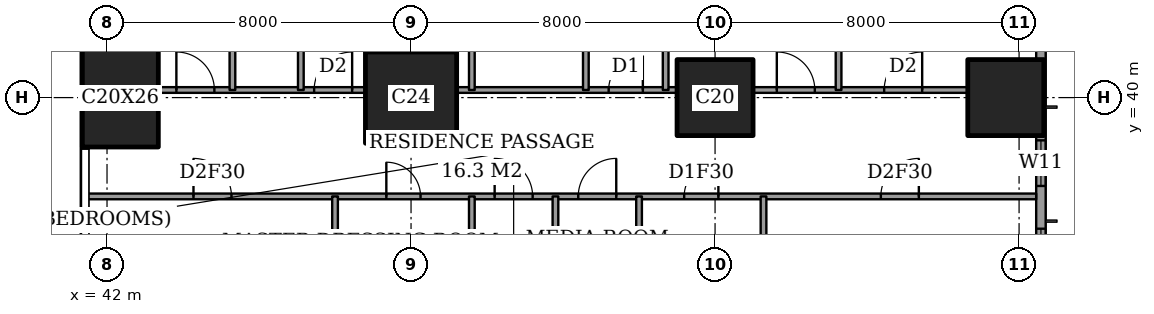
"""IFC4 building model, lengths in metres.
Left out: names, types, materials, properties, quantities, classifications, styles, units other than length and angle.
Written with IfcOpenShell. Run it as: python <this file> out.ifc"""

import sys

from ifc_helpers import new_model, si_unit, direction, frame, frame_2d, origin, origin_2d, place, context, subcontext, project, spatial, rectangle, extrude, element, fill, save


model = new_model("IFC4")
c1 = context("Model", 3, precision=1e-05, world=origin(), true_north=direction((0.0, 1.0)))
c2 = subcontext(c1, "Body", "Model", "MODEL_VIEW")
j1 = project(units=[si_unit("LENGTHUNIT", "METRE"), si_unit("PLANEANGLEUNIT", "RADIAN")], contexts=[c1])
p1 = place(None, origin())
s1 = spatial("IfcSite", under=j1, at=p1, CompositionType="ELEMENT")
p2 = place(p1, origin())
s2 = spatial("IfcBuilding", under=s1, at=p2, CompositionType="ELEMENT")
p3 = place(p2, frame((0.0, 0.0, 153.8)))
s3 = spatial("IfcBuildingStorey", under=s2, at=p3, CompositionType="ELEMENT", Elevation=153.8)
p4 = place(p3, frame((42.35, 40.0, 0.0), z_axis=(0.0, 0.0, 1.0), x_axis=(1.0, 0.0, 0.0)))
e1 = element("IfcColumn", 1, at=p4, inside=s3, PredefinedType="COLUMN", context=c2, shape_type="SweptSolid", body=[
    extrude(rectangle(XDim=2.0, YDim=2.6, at=origin_2d()), origin(), (0.0, 0.0, 1.0), 3.6),
])
p5 = place(p3, frame((50.0, 40.0, 0.0), z_axis=(0.0, 0.0, 1.0), x_axis=(1.0, 0.0, 0.0)))
e2 = element("IfcColumn", 2, at=p5, inside=s3, PredefinedType="COLUMN", context=c2, shape_type="SweptSolid", body=[
    extrude(rectangle(XDim=2.4, YDim=2.4, at=origin_2d()), origin(), (0.0, 0.0, 1.0), 3.6),
])
for number, where, z_axis, x_axis in (
    (3, (58.0, 40.0, 0.0), (0.0, 0.0, 1.0), (1.0, 0.0, 0.0)),
    (4, (65.65, 40.0, 0.0), (0.0, 0.0, 1.0), (1.0, 0.0, 0.0)),
):
    element("IfcColumn", number, at=place(p3, frame(where, z_axis=z_axis, x_axis=x_axis)), inside=s3, PredefinedType="COLUMN", context=c2, shape_type="SweptSolid", body=[
        extrude(rectangle(XDim=2.0, YDim=2.0, at=origin_2d()), origin(), (0.0, 0.0, 1.0), 3.6),
    ])
p6 = place(p3, frame((66.575, 3.175, 0.0), z_axis=(0.0, 0.0, 1.0), x_axis=(0.0, 1.0, 0.0)))
e5 = element("IfcWall", 5, at=p6, inside=s3, PredefinedType="SOLIDWALL", context=c2, shape_type="SweptSolid", body=[
    extrude(rectangle(XDim=41.65, YDim=0.25, at=frame_2d((20.825, 0.0))), origin(), (0.0, 0.0, 1.0), 3.6),
])
p7 = place(p6, frame((0.775, 0.0, 0.4)))
e6 = element("IfcOpeningElement", 6, at=p7, cuts=e5, PredefinedType="OPENING", context=c2, shape_type="SweptSolid", body=[
    extrude(rectangle(XDim=2.4, YDim=2.2, at=frame_2d((1.2, 1.1))), frame((0.0, 0.135, 0.0), z_axis=(0.0, -1.0, 0.0), x_axis=(1.0, 0.0, 0.0)), (0.0, 0.0, 1.0), 0.27),
])
p8 = place(p6, frame((6.225, 0.0, 0.4)))
e7 = element("IfcOpeningElement", 7, at=p8, cuts=e5, PredefinedType="OPENING", context=c2, shape_type="SweptSolid", body=[
    extrude(rectangle(XDim=1.2, YDim=2.2, at=frame_2d((0.6, 1.1))), frame((0.0, 0.135, 0.0), z_axis=(0.0, -1.0, 0.0), x_axis=(1.0, 0.0, 0.0)), (0.0, 0.0, 1.0), 0.27),
])
p9 = place(p6, frame((8.475, 0.0, 0.4)))
e8 = element("IfcOpeningElement", 8, at=p9, cuts=e5, PredefinedType="OPENING", context=c2, shape_type="SweptSolid", body=[
    extrude(rectangle(XDim=2.4, YDim=2.2, at=frame_2d((1.2, 1.1))), frame((0.0, 0.135, 0.0), z_axis=(0.0, -1.0, 0.0), x_axis=(1.0, 0.0, 0.0)), (0.0, 0.0, 1.0), 0.27),
])
p10 = place(p6, frame((15.775, 0.0, 0.4)))
e9 = element("IfcOpeningElement", 9, at=p10, cuts=e5, PredefinedType="OPENING", context=c2, shape_type="SweptSolid", body=[
    extrude(rectangle(XDim=2.4, YDim=2.2, at=frame_2d((1.2, 1.1))), frame((0.0, 0.135, 0.0), z_axis=(0.0, -1.0, 0.0), x_axis=(1.0, 0.0, 0.0)), (0.0, 0.0, 1.0), 0.27),
])
p11 = place(p6, frame((23.475, 0.0, 0.4)))
e10 = element("IfcOpeningElement", 10, at=p11, cuts=e5, PredefinedType="OPENING", context=c2, shape_type="SweptSolid", body=[
    extrude(rectangle(XDim=2.4, YDim=2.2, at=frame_2d((1.2, 1.1))), frame((0.0, 0.135, 0.0), z_axis=(0.0, -1.0, 0.0), x_axis=(1.0, 0.0, 0.0)), (0.0, 0.0, 1.0), 0.27),
])
p12 = place(p6, frame((30.975, 0.0, 0.4)))
e11 = element("IfcOpeningElement", 11, at=p12, cuts=e5, PredefinedType="OPENING", context=c2, shape_type="SweptSolid", body=[
    extrude(rectangle(XDim=2.4, YDim=2.2, at=frame_2d((1.2, 1.1))), frame((0.0, 0.135, 0.0), z_axis=(0.0, -1.0, 0.0), x_axis=(1.0, 0.0, 0.0)), (0.0, 0.0, 1.0), 0.27),
])
p13 = place(p6, frame((34.5, 0.0, 0.4)))
e12 = element("IfcOpeningElement", 12, at=p13, cuts=e5, PredefinedType="OPENING", context=c2, shape_type="SweptSolid", body=[
    extrude(rectangle(XDim=1.2, YDim=2.2, at=frame_2d((0.6, 1.1))), frame((0.0, 0.135, 0.0), z_axis=(0.0, -1.0, 0.0), x_axis=(1.0, 0.0, 0.0)), (0.0, 0.0, 1.0), 0.27),
])
p14 = place(p6, frame((38.475, 0.0, 0.4)))
e13 = element("IfcOpeningElement", 13, at=p14, cuts=e5, PredefinedType="OPENING", context=c2, shape_type="SweptSolid", body=[
    extrude(rectangle(XDim=2.4, YDim=2.2, at=frame_2d((1.2, 1.1))), frame((0.0, 0.135, 0.0), z_axis=(0.0, -1.0, 0.0), x_axis=(1.0, 0.0, 0.0)), (0.0, 0.0, 1.0), 0.27),
])
p15 = place(p3, frame((41.439, 37.4, 0.0), z_axis=(0.0, 0.0, 1.0), x_axis=(1.0, 0.0, 0.0)))
e14 = element("IfcWall", 14, at=p15, inside=s3, PredefinedType="PARTITIONING", context=c2, shape_type="SweptSolid", body=[
    extrude(rectangle(XDim=25.011, YDim=0.15, at=frame_2d((12.505, 0.0))), origin(), (0.0, 0.0, 1.0), 3.35),
])
p16 = place(p15, frame((10.761, 0.0, 0.0)))
e15 = element("IfcOpeningElement", 15, at=p16, cuts=e14, PredefinedType="OPENING", context=c2, shape_type="SweptSolid", body=[
    extrude(rectangle(XDim=1.0, YDim=2.1, at=frame_2d((0.5, 1.05))), frame((0.0, 0.085, 0.0), z_axis=(0.0, -1.0, 0.0), x_axis=(1.0, 0.0, 0.0)), (0.0, 0.0, 1.0), 0.17),
])
p17 = place(p15, frame((20.924, 0.0, 0.0)))
e16 = element("IfcOpeningElement", 16, at=p17, cuts=e14, PredefinedType="OPENING", context=c2, shape_type="SweptSolid", body=[
    extrude(rectangle(XDim=1.0, YDim=2.1, at=frame_2d((0.5, 1.05))), frame((0.0, 0.085, 0.0), z_axis=(0.0, -1.0, 0.0), x_axis=(1.0, 0.0, 0.0)), (0.0, 0.0, 1.0), 0.17),
])
p18 = place(p15, frame((15.749, 0.0, 0.0)))
e17 = element("IfcOpeningElement", 17, at=p18, cuts=e14, PredefinedType="OPENING", context=c2, shape_type="SweptSolid", body=[
    extrude(rectangle(XDim=0.9, YDim=2.1, at=frame_2d((0.45, 1.05))), frame((0.0, 0.085, 0.0), z_axis=(0.0, -1.0, 0.0), x_axis=(1.0, 0.0, 0.0)), (0.0, 0.0, 1.0), 0.17),
])
p19 = place(p15, frame((12.961, 0.0, 0.0)))
e18 = element("IfcOpeningElement", 18, at=p19, cuts=e14, PredefinedType="OPENING", context=c2, shape_type="SweptSolid", body=[
    extrude(rectangle(XDim=1.0, YDim=2.1, at=frame_2d((0.5, 1.05))), frame((0.0, 0.085, 0.0), z_axis=(0.0, -1.0, 0.0), x_axis=(1.0, 0.0, 0.0)), (0.0, 0.0, 1.0), 0.17),
])
p20 = place(p15, frame((7.911, 0.0, 0.0)))
e19 = element("IfcOpeningElement", 19, at=p20, cuts=e14, PredefinedType="OPENING", context=c2, shape_type="SweptSolid", body=[
    extrude(rectangle(XDim=0.9, YDim=2.1, at=frame_2d((0.45, 1.05))), frame((0.0, 0.085, 0.0), z_axis=(0.0, -1.0, 0.0), x_axis=(1.0, 0.0, 0.0)), (0.0, 0.0, 1.0), 0.17),
])
p21 = place(p15, frame((2.836, 0.0, 0.0)))
e20 = element("IfcOpeningElement", 20, at=p21, cuts=e14, PredefinedType="OPENING", context=c2, shape_type="SweptSolid", body=[
    extrude(rectangle(XDim=1.0, YDim=2.1, at=frame_2d((0.5, 1.05))), frame((0.0, 0.085, 0.0), z_axis=(0.0, -1.0, 0.0), x_axis=(1.0, 0.0, 0.0)), (0.0, 0.0, 1.0), 0.17),
])
p22 = place(p3, frame((43.35, 40.2, 0.0), z_axis=(0.0, 0.0, 1.0), x_axis=(1.0, 0.0, 0.0)))
e21 = element("IfcWall", 21, at=p22, inside=s3, PredefinedType="PARTITIONING", context=c2, shape_type="SweptSolid", body=[
    extrude(rectangle(XDim=5.45, YDim=0.15, at=frame_2d((2.725, 0.0))), origin(), (0.0, 0.0, 1.0), 3.35),
])
p23 = place(p22, frame((4.1, 0.0, 0.0)))
e22 = element("IfcOpeningElement", 22, at=p23, cuts=e21, PredefinedType="OPENING", context=c2, shape_type="SweptSolid", body=[
    extrude(rectangle(XDim=1.0, YDim=2.1, at=frame_2d((0.5, 1.05))), frame((0.0, 0.085, 0.0), z_axis=(0.0, -1.0, 0.0), x_axis=(1.0, 0.0, 0.0)), (0.0, 0.0, 1.0), 0.17),
])
p24 = place(p22, frame((0.475, 0.0, 0.0)))
e23 = element("IfcOpeningElement", 23, at=p24, cuts=e21, PredefinedType="OPENING", context=c2, shape_type="SweptSolid", body=[
    extrude(rectangle(XDim=1.0, YDim=2.1, at=frame_2d((0.5, 1.05))), frame((0.0, 0.085, 0.0), z_axis=(0.0, -1.0, 0.0), x_axis=(1.0, 0.0, 0.0)), (0.0, 0.0, 1.0), 0.17),
])
p25 = place(p3, frame((51.2, 40.2, 0.0), z_axis=(0.0, 0.0, 1.0), x_axis=(1.0, 0.0, 0.0)))
e24 = element("IfcWall", 24, at=p25, inside=s3, PredefinedType="PARTITIONING", context=c2, shape_type="SweptSolid", body=[
    extrude(rectangle(XDim=5.8, YDim=0.15, at=frame_2d((2.9, 0.0))), origin(), (0.0, 0.0, 1.0), 3.35),
])
p26 = place(p25, frame((4.0, 0.0, 0.0)))
e25 = element("IfcOpeningElement", 25, at=p26, cuts=e24, PredefinedType="OPENING", context=c2, shape_type="SweptSolid", body=[
    extrude(rectangle(XDim=0.9, YDim=2.1, at=frame_2d((0.45, 1.05))), frame((0.0, 0.085, 0.0), z_axis=(0.0, -1.0, 0.0), x_axis=(1.0, 0.0, 0.0)), (0.0, 0.0, 1.0), 0.17),
])
p27 = place(p3, frame((59.0, 40.2, 0.0), z_axis=(0.0, 0.0, 1.0), x_axis=(1.0, 0.0, 0.0)))
e26 = element("IfcWall", 26, at=p27, inside=s3, PredefinedType="PARTITIONING", context=c2, shape_type="SweptSolid", body=[
    extrude(rectangle(XDim=5.65, YDim=0.15, at=frame_2d((2.825, 0.0))), origin(), (0.0, 0.0, 1.0), 3.35),
])
p28 = place(p27, frame((3.45, 0.0, 0.0)))
e27 = element("IfcOpeningElement", 27, at=p28, cuts=e26, PredefinedType="OPENING", context=c2, shape_type="SweptSolid", body=[
    extrude(rectangle(XDim=1.0, YDim=2.1, at=frame_2d((0.5, 1.05))), frame((0.0, 0.085, 0.0), z_axis=(0.0, -1.0, 0.0), x_axis=(1.0, 0.0, 0.0)), (0.0, 0.0, 1.0), 0.17),
])
p29 = place(p27, frame((0.625, 0.0, 0.0)))
e28 = element("IfcOpeningElement", 28, at=p29, cuts=e26, PredefinedType="OPENING", context=c2, shape_type="SweptSolid", body=[
    extrude(rectangle(XDim=1.0, YDim=2.1, at=frame_2d((0.5, 1.05))), frame((0.0, 0.085, 0.0), z_axis=(0.0, -1.0, 0.0), x_axis=(1.0, 0.0, 0.0)), (0.0, 0.0, 1.0), 0.17),
])
p30 = place(p3, frame((45.3, 40.2, 0.0), z_axis=(0.0, 0.0, 1.0), x_axis=(0.0, 1.0, 0.0)))
e29 = element("IfcWall", 29, at=p30, inside=s3, PredefinedType="PARTITIONING", context=c2, shape_type="SweptSolid", body=[
    extrude(rectangle(XDim=8.25, YDim=0.15, at=frame_2d((4.125, 0.0))), origin(), (0.0, 0.0, 1.0), 3.35),
])
p31 = place(p30, frame((3.675, 0.0, 0.0)))
e30 = element("IfcOpeningElement", 30, at=p31, cuts=e29, PredefinedType="OPENING", context=c2, shape_type="SweptSolid", body=[
    extrude(rectangle(XDim=0.9, YDim=2.1, at=frame_2d((0.45, 1.05))), frame((0.0, 0.085, 0.0), z_axis=(0.0, -1.0, 0.0), x_axis=(1.0, 0.0, 0.0)), (0.0, 0.0, 1.0), 0.17),
])
p32 = place(p3, frame((47.1, 40.2, 0.0), z_axis=(0.0, 0.0, 1.0), x_axis=(0.0, 1.0, 0.0)))
e31 = element("IfcWall", 31, at=p32, inside=s3, PredefinedType="PARTITIONING", context=c2, shape_type="SweptSolid", body=[
    extrude(rectangle(XDim=8.25, YDim=0.15, at=frame_2d((4.125, 0.0))), origin(), (0.0, 0.0, 1.0), 3.35),
])
p33 = place(p3, frame((48.0, 28.0, 0.0), z_axis=(0.0, 0.0, 1.0), x_axis=(0.0, 1.0, 0.0)))
e32 = element("IfcWall", 32, at=p33, inside=s3, PredefinedType="PARTITIONING", context=c2, shape_type="SweptSolid", body=[
    extrude(rectangle(XDim=9.4, YDim=0.15, at=frame_2d((4.7, 0.0))), origin(), (0.0, 0.0, 1.0), 3.35),
])
p34 = place(p33, frame((0.5, 0.0, 0.0)))
e33 = element("IfcOpeningElement", 33, at=p34, cuts=e32, PredefinedType="OPENING", context=c2, shape_type="SweptSolid", body=[
    extrude(rectangle(XDim=1.0, YDim=2.1, at=frame_2d((0.5, 1.05))), frame((0.0, 0.085, 0.0), z_axis=(0.0, -1.0, 0.0), x_axis=(1.0, 0.0, 0.0)), (0.0, 0.0, 1.0), 0.17),
])
p35 = place(p3, frame((51.6, 30.0, 0.0), z_axis=(0.0, 0.0, 1.0), x_axis=(0.0, 1.0, 0.0)))
e34 = element("IfcWall", 34, at=p35, inside=s3, PredefinedType="PARTITIONING", context=c2, shape_type="SweptSolid", body=[
    extrude(rectangle(XDim=7.4, YDim=0.15, at=frame_2d((3.7, 0.0))), origin(), (0.0, 0.0, 1.0), 3.35),
])
p36 = place(p3, frame((51.6, 40.2, 0.0), z_axis=(0.0, 0.0, 1.0), x_axis=(0.0, 1.0, 0.0)))
e35 = element("IfcWall", 35, at=p36, inside=s3, PredefinedType="PARTITIONING", context=c2, shape_type="SweptSolid", body=[
    extrude(rectangle(XDim=8.25, YDim=0.15, at=frame_2d((4.125, 0.0))), origin(), (0.0, 0.0, 1.0), 3.35),
])
p37 = place(p36, frame((3.675, 0.0, 0.0)))
e36 = element("IfcOpeningElement", 36, at=p37, cuts=e35, PredefinedType="OPENING", context=c2, shape_type="SweptSolid", body=[
    extrude(rectangle(XDim=0.9, YDim=2.1, at=frame_2d((0.45, 1.05))), frame((0.0, 0.085, 0.0), z_axis=(0.0, -1.0, 0.0), x_axis=(1.0, 0.0, 0.0)), (0.0, 0.0, 1.0), 0.17),
])
p38 = place(p3, frame((53.8, 30.0, 0.0), z_axis=(0.0, 0.0, 1.0), x_axis=(0.0, 1.0, 0.0)))
e37 = element("IfcWall", 37, at=p38, inside=s3, PredefinedType="PARTITIONING", context=c2, shape_type="SweptSolid", body=[
    extrude(rectangle(XDim=7.4, YDim=0.15, at=frame_2d((3.7, 0.0))), origin(), (0.0, 0.0, 1.0), 3.35),
])
p39 = place(p3, frame((54.6, 40.2, 0.0), z_axis=(0.0, 0.0, 1.0), x_axis=(0.0, 1.0, 0.0)))
e38 = element("IfcWall", 38, at=p39, inside=s3, PredefinedType="PARTITIONING", context=c2, shape_type="SweptSolid", body=[
    extrude(rectangle(XDim=8.25, YDim=0.15, at=frame_2d((4.125, 0.0))), origin(), (0.0, 0.0, 1.0), 3.35),
])
p40 = place(p3, frame((56.0, 28.0, 0.0), z_axis=(0.0, 0.0, 1.0), x_axis=(0.0, 1.0, 0.0)))
e39 = element("IfcWall", 39, at=p40, inside=s3, PredefinedType="PARTITIONING", context=c2, shape_type="SweptSolid", body=[
    extrude(rectangle(XDim=9.4, YDim=0.15, at=frame_2d((4.7, 0.0))), origin(), (0.0, 0.0, 1.0), 3.35),
])
p41 = place(p40, frame((0.5, 0.0, 0.0)))
e40 = element("IfcOpeningElement", 40, at=p41, cuts=e39, PredefinedType="OPENING", context=c2, shape_type="SweptSolid", body=[
    extrude(rectangle(XDim=1.0, YDim=2.1, at=frame_2d((0.5, 1.05))), frame((0.0, 0.085, 0.0), z_axis=(0.0, -1.0, 0.0), x_axis=(1.0, 0.0, 0.0)), (0.0, 0.0, 1.0), 0.17),
])
p42 = place(p3, frame((56.7, 40.2, 0.0), z_axis=(0.0, 0.0, 1.0), x_axis=(0.0, 1.0, 0.0)))
e41 = element("IfcWall", 41, at=p42, inside=s3, PredefinedType="PARTITIONING", context=c2, shape_type="SweptSolid", body=[
    extrude(rectangle(XDim=8.25, YDim=0.15, at=frame_2d((4.125, 0.0))), origin(), (0.0, 0.0, 1.0), 3.35),
])
p43 = place(p3, frame((59.275, 33.2, 0.0), z_axis=(0.0, 0.0, 1.0), x_axis=(0.0, 1.0, 0.0)))
e42 = element("IfcWall", 42, at=p43, inside=s3, PredefinedType="PARTITIONING", context=c2, shape_type="SweptSolid", body=[
    extrude(rectangle(XDim=4.2, YDim=0.15, at=frame_2d((2.1, 0.0))), origin(), (0.0, 0.0, 1.0), 3.35),
])
p44 = place(p3, frame((61.25, 40.2, 0.0), z_axis=(0.0, 0.0, 1.0), x_axis=(0.0, 1.0, 0.0)))
e43 = element("IfcWall", 43, at=p44, inside=s3, PredefinedType="PARTITIONING", context=c2, shape_type="SweptSolid", body=[
    extrude(rectangle(XDim=8.25, YDim=0.15, at=frame_2d((4.125, 0.0))), origin(), (0.0, 0.0, 1.0), 3.35),
])
p45 = place(p12, origin())
e44 = element("IfcWindow", 44, at=p45, inside=s3, PartitioningType="SINGLE_PANEL", PredefinedType="WINDOW", context=c2, shape_type="SweptSolid", body=[
    extrude(rectangle(XDim=2.4, YDim=2.2, at=frame_2d((1.2, 1.1))), frame((0.0, 0.03, 0.0), z_axis=(0.0, -1.0, 0.0), x_axis=(1.0, 0.0, 0.0)), (0.0, 0.0, 1.0), 0.06),
])
fill(e11, e44)
p46 = place(p13, origin())
e45 = element("IfcWindow", 45, at=p46, inside=s3, PartitioningType="SINGLE_PANEL", PredefinedType="WINDOW", context=c2, shape_type="SweptSolid", body=[
    extrude(rectangle(XDim=1.2, YDim=2.2, at=frame_2d((0.6, 1.1))), frame((0.0, 0.03, 0.0), z_axis=(0.0, -1.0, 0.0), x_axis=(1.0, 0.0, 0.0)), (0.0, 0.0, 1.0), 0.06),
])
fill(e12, e45)
p47 = place(p28, origin())
e46 = element("IfcDoor", 46, at=p47, inside=s3, OperationType="SINGLE_SWING_LEFT", PredefinedType="DOOR", context=c2, shape_type="SweptSolid", body=[
    extrude(rectangle(XDim=1.0, YDim=2.1, at=frame_2d((0.5, 1.05))), frame((0.0, 0.025, 0.0), z_axis=(0.0, -1.0, 0.0), x_axis=(1.0, 0.0, 0.0)), (0.0, 0.0, 1.0), 0.05),
])
fill(e27, e46)
p48 = place(p29, origin())
e47 = element("IfcDoor", 47, at=p48, inside=s3, OperationType="SINGLE_SWING_RIGHT", PredefinedType="DOOR", context=c2, shape_type="SweptSolid", body=[
    extrude(rectangle(XDim=1.0, YDim=2.1, at=frame_2d((0.5, 1.05))), frame((0.0, 0.025, 0.0), z_axis=(0.0, -1.0, 0.0), x_axis=(1.0, 0.0, 0.0)), (0.0, 0.0, 1.0), 0.05),
])
fill(e28, e47)
p49 = place(p26, origin())
e48 = element("IfcDoor", 48, at=p49, inside=s3, OperationType="SINGLE_SWING_LEFT", PredefinedType="DOOR", context=c2, shape_type="SweptSolid", body=[
    extrude(rectangle(XDim=0.9, YDim=2.1, at=frame_2d((0.45, 1.05))), frame((0.0, 0.025, 0.0), z_axis=(0.0, -1.0, 0.0), x_axis=(1.0, 0.0, 0.0)), (0.0, 0.0, 1.0), 0.05),
])
fill(e25, e48)
p50 = place(p23, origin())
e49 = element("IfcDoor", 49, at=p50, inside=s3, OperationType="SINGLE_SWING_LEFT", PredefinedType="DOOR", context=c2, shape_type="SweptSolid", body=[
    extrude(rectangle(XDim=1.0, YDim=2.1, at=frame_2d((0.5, 1.05))), frame((0.0, 0.025, 0.0), z_axis=(0.0, -1.0, 0.0), x_axis=(1.0, 0.0, 0.0)), (0.0, 0.0, 1.0), 0.05),
])
fill(e22, e49)
p51 = place(p24, origin())
e50 = element("IfcDoor", 50, at=p51, inside=s3, OperationType="SINGLE_SWING_RIGHT", PredefinedType="DOOR", context=c2, shape_type="SweptSolid", body=[
    extrude(rectangle(XDim=1.0, YDim=2.1, at=frame_2d((0.5, 1.05))), frame((0.0, 0.025, 0.0), z_axis=(0.0, -1.0, 0.0), x_axis=(1.0, 0.0, 0.0)), (0.0, 0.0, 1.0), 0.05),
])
fill(e23, e50)
p52 = place(p16, origin())
e51 = element("IfcDoor", 51, at=p52, inside=s3, OperationType="SINGLE_SWING_RIGHT", PredefinedType="DOOR", context=c2, shape_type="SweptSolid", body=[
    extrude(rectangle(XDim=1.0, YDim=2.1, at=frame_2d((0.5, 1.05))), frame((0.0, 0.025, 0.0), z_axis=(0.0, -1.0, 0.0), x_axis=(1.0, 0.0, 0.0)), (0.0, 0.0, 1.0), 0.05),
])
fill(e15, e51)
p53 = place(p17, origin())
e52 = element("IfcDoor", 52, at=p53, inside=s3, OperationType="SINGLE_SWING_LEFT", PredefinedType="DOOR", context=c2, shape_type="SweptSolid", body=[
    extrude(rectangle(XDim=1.0, YDim=2.1, at=frame_2d((0.5, 1.05))), frame((0.0, 0.025, 0.0), z_axis=(0.0, -1.0, 0.0), x_axis=(1.0, 0.0, 0.0)), (0.0, 0.0, 1.0), 0.05),
])
fill(e16, e52)
p54 = place(p18, origin())
e53 = element("IfcDoor", 53, at=p54, inside=s3, OperationType="SINGLE_SWING_LEFT", PredefinedType="DOOR", context=c2, shape_type="SweptSolid", body=[
    extrude(rectangle(XDim=0.9, YDim=2.1, at=frame_2d((0.45, 1.05))), frame((0.0, 0.025, 0.0), z_axis=(0.0, -1.0, 0.0), x_axis=(1.0, 0.0, 0.0)), (0.0, 0.0, 1.0), 0.05),
])
fill(e17, e53)
p55 = place(p19, origin())
e54 = element("IfcDoor", 54, at=p55, inside=s3, OperationType="SINGLE_SWING_LEFT", PredefinedType="DOOR", context=c2, shape_type="SweptSolid", body=[
    extrude(rectangle(XDim=1.0, YDim=2.1, at=frame_2d((0.5, 1.05))), frame((0.0, 0.025, 0.0), z_axis=(0.0, -1.0, 0.0), x_axis=(1.0, 0.0, 0.0)), (0.0, 0.0, 1.0), 0.05),
])
fill(e18, e54)
p56 = place(p20, origin())
e55 = element("IfcDoor", 55, at=p56, inside=s3, OperationType="SINGLE_SWING_RIGHT", PredefinedType="DOOR", context=c2, shape_type="SweptSolid", body=[
    extrude(rectangle(XDim=0.9, YDim=2.1, at=frame_2d((0.45, 1.05))), frame((0.0, 0.025, 0.0), z_axis=(0.0, -1.0, 0.0), x_axis=(1.0, 0.0, 0.0)), (0.0, 0.0, 1.0), 0.05),
])
fill(e19, e55)
p57 = place(p21, origin())
e56 = element("IfcDoor", 56, at=p57, inside=s3, OperationType="SINGLE_SWING_RIGHT", PredefinedType="DOOR", context=c2, shape_type="SweptSolid", body=[
    extrude(rectangle(XDim=1.0, YDim=2.1, at=frame_2d((0.5, 1.05))), frame((0.0, 0.025, 0.0), z_axis=(0.0, -1.0, 0.0), x_axis=(1.0, 0.0, 0.0)), (0.0, 0.0, 1.0), 0.05),
])
fill(e20, e56)
save(model, sys.argv[1])
